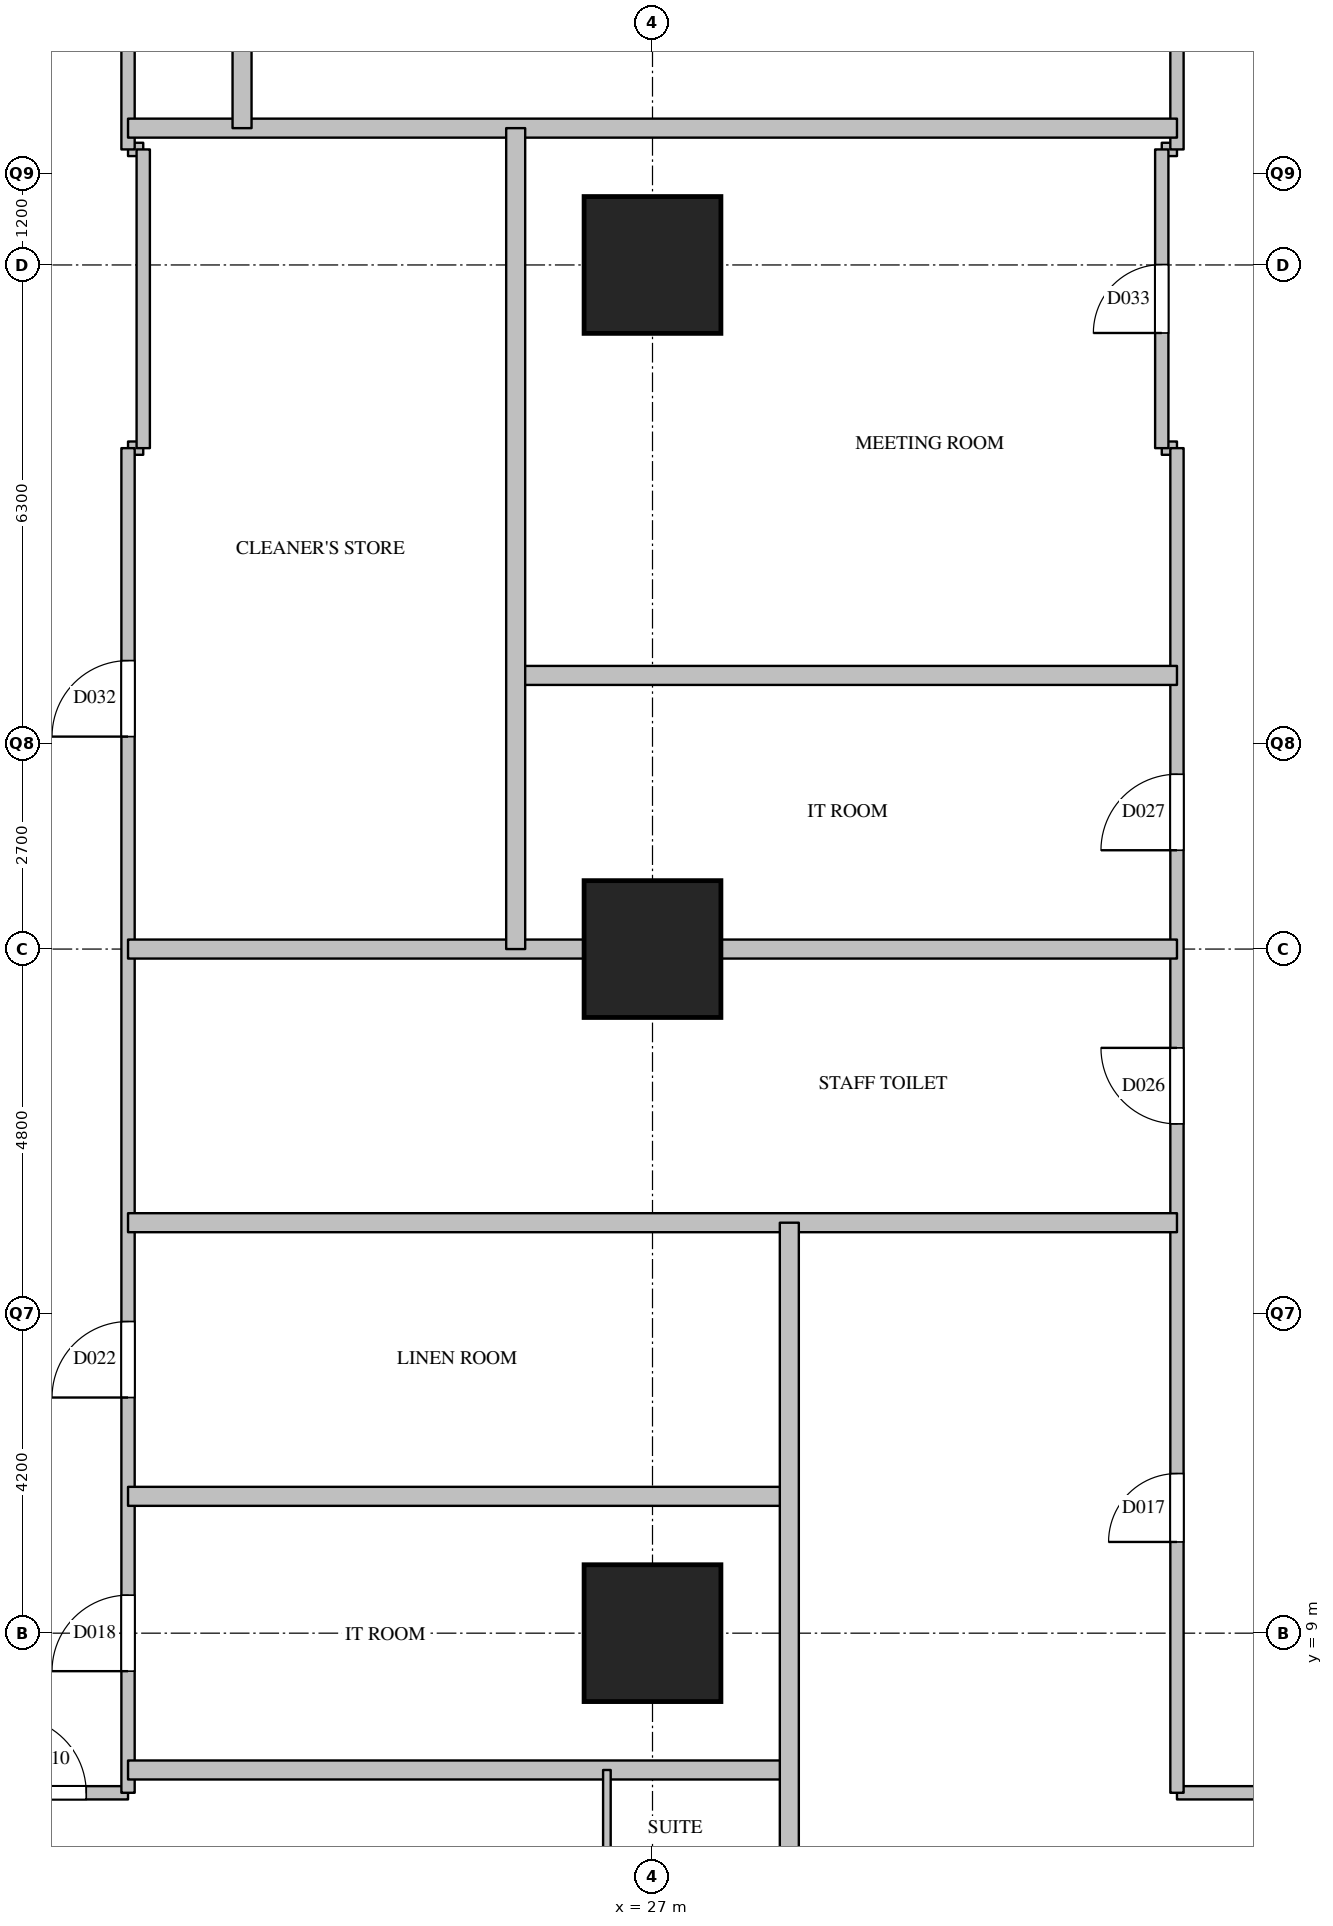
"""IFC4 building model, lengths in metres.
Left out: names, types, materials, properties, quantities, classifications, styles, units other than length and angle.
Written with IfcOpenShell. Run it as: python <this file> out.ifc"""

import sys

from ifc_helpers import new_model, si_unit, direction, frame, frame_2d, origin, origin_2d, place, context, subcontext, project, spatial, rectangle, extrude, element, fill, save


model = new_model("IFC4")
c1 = context("Model", 3, precision=1e-05, world=origin(), true_north=direction((0.0, 1.0)))
c2 = subcontext(c1, "Body", "Model", "MODEL_VIEW")
j1 = project(units=[si_unit("LENGTHUNIT", "METRE"), si_unit("PLANEANGLEUNIT", "RADIAN")], contexts=[c1])
p1 = place(None, origin())
s1 = spatial("IfcSite", under=j1, at=p1, CompositionType="ELEMENT")
p2 = place(p1, origin())
s2 = spatial("IfcBuilding", under=s1, at=p2, CompositionType="ELEMENT")
p3 = place(p2, frame((0.0, 0.0, 69.0)))
s3 = spatial("IfcBuildingStorey", under=s2, at=p3, CompositionType="ELEMENT", Elevation=69.0)
for number, where, z_axis, x_axis in (
    (1, (27.0, 9.0, 0.0), (0.0, 0.0, 1.0), (1.0, 0.0, 0.0)),
    (2, (27.0, 18.0, 0.0), (0.0, 0.0, 1.0), (1.0, 0.0, 0.0)),
    (3, (27.0, 27.0, 0.0), (0.0, 0.0, 1.0), (1.0, 0.0, 0.0)),
):
    element("IfcColumn", number, at=place(p3, frame(where, z_axis=z_axis, x_axis=x_axis)), inside=s3, PredefinedType="COLUMN", context=c2, shape_type="SweptSolid", body=[
        extrude(rectangle(XDim=1.8, YDim=1.8, at=origin_2d()), origin(), (0.0, 0.0, 1.0), 3.8),
    ])
p4 = place(p3, frame((6.9, 6.9, 0.0), z_axis=(0.0, 0.0, 1.0), x_axis=(1.0, 0.0, 0.0)))
e4 = element("IfcWall", 4, at=p4, inside=s3, PredefinedType="PARTITIONING", context=c2, shape_type="SweptSolid", body=[
    extrude(rectangle(XDim=13.2, YDim=0.175, at=frame_2d((6.6, 0.0))), origin(), (0.0, 0.0, 1.0), 3.5),
])
p5 = place(p4, frame((4.2, 0.0, 0.0)))
e5 = element("IfcOpeningElement", 5, at=p5, cuts=e4, PredefinedType="OPENING", context=c2, shape_type="SweptSolid", body=[
    extrude(rectangle(XDim=1.0, YDim=2.1, at=frame_2d((0.5, 1.05))), frame((0.0, 0.097, 0.0), z_axis=(0.0, -1.0, 0.0), x_axis=(1.0, 0.0, 0.0)), (0.0, 0.0, 1.0), 0.195),
])
p6 = place(p4, frame((7.8, 0.0, 0.0)))
e6 = element("IfcOpeningElement", 6, at=p6, cuts=e4, PredefinedType="OPENING", context=c2, shape_type="SweptSolid", body=[
    extrude(rectangle(XDim=1.0, YDim=2.1, at=frame_2d((0.5, 1.05))), frame((0.0, 0.097, 0.0), z_axis=(0.0, -1.0, 0.0), x_axis=(1.0, 0.0, 0.0)), (0.0, 0.0, 1.0), 0.195),
])
p7 = place(p4, frame((11.65, 0.0, 0.0)))
e7 = element("IfcOpeningElement", 7, at=p7, cuts=e4, PredefinedType="OPENING", context=c2, shape_type="SweptSolid", body=[
    extrude(rectangle(XDim=1.0, YDim=2.1, at=frame_2d((0.5, 1.05))), frame((0.0, 0.097, 0.0), z_axis=(0.0, -1.0, 0.0), x_axis=(1.0, 0.0, 0.0)), (0.0, 0.0, 1.0), 0.195),
])
p8 = place(p4, frame((0.25, 0.0, 0.0)))
e8 = element("IfcOpeningElement", 8, at=p8, cuts=e4, PredefinedType="OPENING", context=c2, shape_type="SweptSolid", body=[
    extrude(rectangle(XDim=1.0, YDim=2.1, at=frame_2d((0.5, 1.05))), frame((0.0, 0.097, 0.0), z_axis=(0.0, -1.0, 0.0), x_axis=(1.0, 0.0, 0.0)), (0.0, 0.0, 1.0), 0.195),
])
p9 = place(p3, frame((33.9, 6.9, 0.0), z_axis=(0.0, 0.0, 1.0), x_axis=(1.0, 0.0, 0.0)))
e9 = element("IfcWall", 9, at=p9, inside=s3, PredefinedType="PARTITIONING", context=c2, shape_type="SweptSolid", body=[
    extrude(rectangle(XDim=13.2, YDim=0.175, at=frame_2d((6.6, 0.0))), origin(), (0.0, 0.0, 1.0), 3.5),
])
p10 = place(p9, frame((4.0, 0.0, 0.0)))
e10 = element("IfcOpeningElement", 10, at=p10, cuts=e9, PredefinedType="OPENING", context=c2, shape_type="SweptSolid", body=[
    extrude(rectangle(XDim=1.0, YDim=2.1, at=frame_2d((0.5, 1.05))), frame((0.0, 0.097, 0.0), z_axis=(0.0, -1.0, 0.0), x_axis=(1.0, 0.0, 0.0)), (0.0, 0.0, 1.0), 0.195),
])
for number, where, z_axis, x_axis in (
    (11, (20.1, 24.59, 0.0), (0.0, 0.0, 1.0), (1.0, 0.0, 0.0)),
    (12, (33.7, 24.59, 0.0), (0.0, 0.0, 1.0), (1.0, 0.0, 0.0)),
    (13, (20.1, 28.52, 0.0), (0.0, 0.0, 1.0), (1.0, 0.0, 0.0)),
    (14, (33.7, 28.52, 0.0), (0.0, 0.0, 1.0), (1.0, 0.0, 0.0)),
):
    element("IfcWall", number, at=place(p3, frame(where, z_axis=z_axis, x_axis=x_axis)), inside=s3, PredefinedType="PARTITIONING", context=c2, shape_type="SweptSolid", body=[
        extrude(rectangle(XDim=0.2, YDim=0.175, at=frame_2d((0.1, 0.0))), origin(), (0.0, 0.0, 1.0), 3.5),
    ])
p11 = place(p3, frame((20.1, 6.9, 0.0), z_axis=(0.0, 0.0, 1.0), x_axis=(0.0, 1.0, 0.0)))
e15 = element("IfcWall", 15, at=p11, inside=s3, PredefinedType="PARTITIONING", context=c2, shape_type="SweptSolid", body=[
    extrude(rectangle(XDim=17.69, YDim=0.175, at=frame_2d((8.845, 0.0))), origin(), (0.0, 0.0, 1.0), 3.5),
])
p12 = place(p11, frame((1.6, 0.0, 0.0)))
e16 = element("IfcOpeningElement", 16, at=p12, cuts=e15, PredefinedType="OPENING", context=c2, shape_type="SweptSolid", body=[
    extrude(rectangle(XDim=1.0, YDim=2.1, at=frame_2d((0.5, 1.05))), frame((0.0, 0.097, 0.0), z_axis=(0.0, -1.0, 0.0), x_axis=(1.0, 0.0, 0.0)), (0.0, 0.0, 1.0), 0.195),
])
p13 = place(p11, frame((5.2, 0.0, 0.0)))
e17 = element("IfcOpeningElement", 17, at=p13, cuts=e15, PredefinedType="OPENING", context=c2, shape_type="SweptSolid", body=[
    extrude(rectangle(XDim=1.0, YDim=2.1, at=frame_2d((0.5, 1.05))), frame((0.0, 0.097, 0.0), z_axis=(0.0, -1.0, 0.0), x_axis=(1.0, 0.0, 0.0)), (0.0, 0.0, 1.0), 0.195),
])
p14 = place(p11, frame((13.895, 0.0, 0.0)))
e18 = element("IfcOpeningElement", 18, at=p14, cuts=e15, PredefinedType="OPENING", context=c2, shape_type="SweptSolid", body=[
    extrude(rectangle(XDim=1.0, YDim=2.1, at=frame_2d((0.5, 1.05))), frame((0.0, 0.097, 0.0), z_axis=(0.0, -1.0, 0.0), x_axis=(1.0, 0.0, 0.0)), (0.0, 0.0, 1.0), 0.195),
])
p15 = place(p3, frame((20.1, 28.52, 0.0), z_axis=(0.0, 0.0, 1.0), x_axis=(0.0, 1.0, 0.0)))
e19 = element("IfcWall", 19, at=p15, inside=s3, PredefinedType="PARTITIONING", context=c2, shape_type="SweptSolid", body=[
    extrude(rectangle(XDim=23.58, YDim=0.175, at=frame_2d((11.79, 0.0))), origin(), (0.0, 0.0, 1.0), 3.5),
])
p16 = place(p15, frame((3.43, 0.0, 0.0)))
e20 = element("IfcOpeningElement", 20, at=p16, cuts=e19, PredefinedType="OPENING", context=c2, shape_type="SweptSolid", body=[
    extrude(rectangle(XDim=0.9, YDim=2.1, at=frame_2d((0.45, 1.05))), frame((0.0, 0.097, 0.0), z_axis=(0.0, -1.0, 0.0), x_axis=(1.0, 0.0, 0.0)), (0.0, 0.0, 1.0), 0.195),
])
p17 = place(p15, frame((15.08, 0.0, 0.0)))
e21 = element("IfcOpeningElement", 21, at=p17, cuts=e19, PredefinedType="OPENING", context=c2, shape_type="SweptSolid", body=[
    extrude(rectangle(XDim=0.9, YDim=2.1, at=frame_2d((0.45, 1.05))), frame((0.0, 0.097, 0.0), z_axis=(0.0, -1.0, 0.0), x_axis=(1.0, 0.0, 0.0)), (0.0, 0.0, 1.0), 0.195),
])
p18 = place(p3, frame((20.3, 24.59, 0.0), z_axis=(0.0, 0.0, 1.0), x_axis=(0.0, 1.0, 0.0)))
e22 = element("IfcWall", 22, at=p18, inside=s3, PredefinedType="PARTITIONING", context=c2, shape_type="SweptSolid", body=[
    extrude(rectangle(XDim=3.93, YDim=0.175, at=frame_2d((1.965, 0.0))), origin(), (0.0, 0.0, 1.0), 2.5),
])
p19 = place(p3, frame((33.7, 24.59, 0.0), z_axis=(0.0, 0.0, 1.0), x_axis=(0.0, 1.0, 0.0)))
e23 = element("IfcWall", 23, at=p19, inside=s3, PredefinedType="PARTITIONING", context=c2, shape_type="SweptSolid", body=[
    extrude(rectangle(XDim=3.93, YDim=0.175, at=frame_2d((1.965, 0.0))), origin(), (0.0, 0.0, 1.0), 2.5),
])
p20 = place(p19, frame((1.515, 0.0, 0.0)))
e24 = element("IfcOpeningElement", 24, at=p20, cuts=e23, PredefinedType="OPENING", context=c2, shape_type="SweptSolid", body=[
    extrude(rectangle(XDim=0.9, YDim=2.1, at=frame_2d((0.45, 1.05))), frame((0.0, 0.097, 0.0), z_axis=(0.0, -1.0, 0.0), x_axis=(1.0, 0.0, 0.0)), (0.0, 0.0, 1.0), 0.195),
])
p21 = place(p3, frame((33.9, 6.9, 0.0), z_axis=(0.0, 0.0, 1.0), x_axis=(0.0, 1.0, 0.0)))
e25 = element("IfcWall", 25, at=p21, inside=s3, PredefinedType="PARTITIONING", context=c2, shape_type="SweptSolid", body=[
    extrude(rectangle(XDim=17.69, YDim=0.175, at=frame_2d((8.845, 0.0))), origin(), (0.0, 0.0, 1.0), 3.5),
])
p22 = place(p21, frame((3.3, 0.0, 0.0)))
e26 = element("IfcOpeningElement", 26, at=p22, cuts=e25, PredefinedType="OPENING", context=c2, shape_type="SweptSolid", body=[
    extrude(rectangle(XDim=0.9, YDim=2.1, at=frame_2d((0.45, 1.05))), frame((0.0, 0.097, 0.0), z_axis=(0.0, -1.0, 0.0), x_axis=(1.0, 0.0, 0.0)), (0.0, 0.0, 1.0), 0.195),
])
p23 = place(p21, frame((8.8, 0.0, 0.0)))
e27 = element("IfcOpeningElement", 27, at=p23, cuts=e25, PredefinedType="OPENING", context=c2, shape_type="SweptSolid", body=[
    extrude(rectangle(XDim=1.0, YDim=2.1, at=frame_2d((0.5, 1.05))), frame((0.0, 0.097, 0.0), z_axis=(0.0, -1.0, 0.0), x_axis=(1.0, 0.0, 0.0)), (0.0, 0.0, 1.0), 0.195),
])
p24 = place(p21, frame((12.4, 0.0, 0.0)))
e28 = element("IfcOpeningElement", 28, at=p24, cuts=e25, PredefinedType="OPENING", context=c2, shape_type="SweptSolid", body=[
    extrude(rectangle(XDim=1.0, YDim=2.1, at=frame_2d((0.5, 1.05))), frame((0.0, 0.097, 0.0), z_axis=(0.0, -1.0, 0.0), x_axis=(1.0, 0.0, 0.0)), (0.0, 0.0, 1.0), 0.195),
])
p25 = place(p3, frame((33.9, 28.52, 0.0), z_axis=(0.0, 0.0, 1.0), x_axis=(0.0, 1.0, 0.0)))
e29 = element("IfcWall", 29, at=p25, inside=s3, PredefinedType="PARTITIONING", context=c2, shape_type="SweptSolid", body=[
    extrude(rectangle(XDim=23.58, YDim=0.175, at=frame_2d((11.79, 0.0))), origin(), (0.0, 0.0, 1.0), 3.5),
])
p26 = place(p25, frame((3.38, 0.0, 0.0)))
e30 = element("IfcOpeningElement", 30, at=p26, cuts=e29, PredefinedType="OPENING", context=c2, shape_type="SweptSolid", body=[
    extrude(rectangle(XDim=1.0, YDim=2.1, at=frame_2d((0.5, 1.05))), frame((0.0, 0.097, 0.0), z_axis=(0.0, -1.0, 0.0), x_axis=(1.0, 0.0, 0.0)), (0.0, 0.0, 1.0), 0.195),
])
p27 = place(p25, frame((10.58, 0.0, 0.0)))
e31 = element("IfcOpeningElement", 31, at=p27, cuts=e29, PredefinedType="OPENING", context=c2, shape_type="SweptSolid", body=[
    extrude(rectangle(XDim=1.0, YDim=2.1, at=frame_2d((0.5, 1.05))), frame((0.0, 0.097, 0.0), z_axis=(0.0, -1.0, 0.0), x_axis=(1.0, 0.0, 0.0)), (0.0, 0.0, 1.0), 0.195),
])
p28 = place(p25, frame((15.98, 0.0, 0.0)))
e32 = element("IfcOpeningElement", 32, at=p28, cuts=e29, PredefinedType="OPENING", context=c2, shape_type="SweptSolid", body=[
    extrude(rectangle(XDim=1.0, YDim=2.1, at=frame_2d((0.5, 1.05))), frame((0.0, 0.097, 0.0), z_axis=(0.0, -1.0, 0.0), x_axis=(1.0, 0.0, 0.0)), (0.0, 0.0, 1.0), 0.195),
])
p29 = place(p25, frame((20.48, 0.0, 0.0)))
e33 = element("IfcOpeningElement", 33, at=p29, cuts=e29, PredefinedType="OPENING", context=c2, shape_type="SweptSolid", body=[
    extrude(rectangle(XDim=0.9, YDim=2.1, at=frame_2d((0.45, 1.05))), frame((0.0, 0.097, 0.0), z_axis=(0.0, -1.0, 0.0), x_axis=(1.0, 0.0, 0.0)), (0.0, 0.0, 1.0), 0.195),
])
for number, where, z_axis, x_axis in (
    (34, (20.1, 7.2, 0.0), (0.0, 0.0, 1.0), (1.0, 0.0, 0.0)),
    (35, (20.1, 10.8, 0.0), (0.0, 0.0, 1.0), (1.0, 0.0, 0.0)),
):
    element("IfcWall", number, at=place(p3, frame(where, z_axis=z_axis, x_axis=x_axis)), inside=s3, PredefinedType="PARTITIONING", context=c2, shape_type="SweptSolid", body=[
        extrude(rectangle(XDim=8.7, YDim=0.25, at=frame_2d((4.35, 0.0))), origin(), (0.0, 0.0, 1.0), 2.5),
    ])
p30 = place(p3, frame((20.1, 14.4, 0.0), z_axis=(0.0, 0.0, 1.0), x_axis=(1.0, 0.0, 0.0)))
e36 = element("IfcWall", 36, at=p30, inside=s3, PredefinedType="PARTITIONING", context=c2, shape_type="SweptSolid", body=[
    extrude(rectangle(XDim=13.8, YDim=0.25, at=frame_2d((6.9, 0.0))), origin(), (0.0, 0.0, 1.0), 2.5),
])
p31 = place(p3, frame((20.1, 18.0, 0.0), z_axis=(0.0, 0.0, 1.0), x_axis=(1.0, 0.0, 0.0)))
e37 = element("IfcWall", 37, at=p31, inside=s3, PredefinedType="PARTITIONING", context=c2, shape_type="SweptSolid", body=[
    extrude(rectangle(XDim=13.8, YDim=0.25, at=frame_2d((6.9, 0.0))), origin(), (0.0, 0.0, 1.0), 3.5),
])
p32 = place(p3, frame((25.2, 21.6, 0.0), z_axis=(0.0, 0.0, 1.0), x_axis=(1.0, 0.0, 0.0)))
e38 = element("IfcWall", 38, at=p32, inside=s3, PredefinedType="PARTITIONING", context=c2, shape_type="SweptSolid", body=[
    extrude(rectangle(XDim=8.7, YDim=0.25, at=frame_2d((4.35, 0.0))), origin(), (0.0, 0.0, 1.0), 2.5),
])
p33 = place(p3, frame((20.1, 28.8, 0.0), z_axis=(0.0, 0.0, 1.0), x_axis=(1.0, 0.0, 0.0)))
e39 = element("IfcWall", 39, at=p33, inside=s3, PredefinedType="PARTITIONING", context=c2, shape_type="SweptSolid", body=[
    extrude(rectangle(XDim=13.8, YDim=0.25, at=frame_2d((6.9, 0.0))), origin(), (0.0, 0.0, 1.0), 2.5),
])
p34 = place(p3, frame((21.6, 28.8, 0.0), z_axis=(0.0, 0.0, 1.0), x_axis=(0.0, 1.0, 0.0)))
e40 = element("IfcWall", 40, at=p34, inside=s3, PredefinedType="PARTITIONING", context=c2, shape_type="SweptSolid", body=[
    extrude(rectangle(XDim=7.2, YDim=0.25, at=frame_2d((3.6, 0.0))), origin(), (0.0, 0.0, 1.0), 3.5),
])
p35 = place(p3, frame((25.2, 18.0, 0.0), z_axis=(0.0, 0.0, 1.0), x_axis=(0.0, 1.0, 0.0)))
e41 = element("IfcWall", 41, at=p35, inside=s3, PredefinedType="PARTITIONING", context=c2, shape_type="SweptSolid", body=[
    extrude(rectangle(XDim=10.8, YDim=0.25, at=frame_2d((5.4, 0.0))), origin(), (0.0, 0.0, 1.0), 2.5),
])
p36 = place(p3, frame((28.8, 0.0, 0.0), z_axis=(0.0, 0.0, 1.0), x_axis=(0.0, 1.0, 0.0)))
e42 = element("IfcWall", 42, at=p36, inside=s3, PredefinedType="PARTITIONING", context=c2, shape_type="SweptSolid", body=[
    extrude(rectangle(XDim=14.4, YDim=0.25, at=frame_2d((7.2, 0.0))), origin(), (0.0, 0.0, 1.0), 2.5),
])
p37 = place(p3, frame((26.4, 4.8, 0.0), z_axis=(0.0, 0.0, 1.0), x_axis=(0.0, 1.0, 0.0)))
e43 = element("IfcWall", 43, at=p37, inside=s3, PredefinedType="PARTITIONING", context=c2, shape_type="SweptSolid", body=[
    extrude(rectangle(XDim=2.4, YDim=0.1, at=frame_2d((1.2, 0.0))), origin(), (0.0, 0.0, 1.0), 3.5),
])
p38 = place(p7, origin())
e44 = element("IfcDoor", 44, at=p38, inside=s3, OperationType="SINGLE_SWING_LEFT", PredefinedType="DOOR", context=c2, shape_type="SweptSolid", body=[
    extrude(rectangle(XDim=1.0, YDim=2.1, at=frame_2d((0.5, 1.05))), frame((0.0, 0.025, 0.0), z_axis=(0.0, -1.0, 0.0), x_axis=(1.0, 0.0, 0.0)), (0.0, 0.0, 1.0), 0.05),
])
fill(e7, e44)
p39 = place(p22, origin())
e45 = element("IfcDoor", 45, at=p39, inside=s3, OperationType="SINGLE_SWING_LEFT", PredefinedType="DOOR", context=c2, shape_type="SweptSolid", body=[
    extrude(rectangle(XDim=0.9, YDim=2.1, at=frame_2d((0.45, 1.05))), frame((0.0, 0.025, 0.0), z_axis=(0.0, -1.0, 0.0), x_axis=(1.0, 0.0, 0.0)), (0.0, 0.0, 1.0), 0.05),
])
fill(e26, e45)
p40 = place(p12, origin())
e46 = element("IfcDoor", 46, at=p40, inside=s3, OperationType="SINGLE_SWING_LEFT", PredefinedType="DOOR", context=c2, shape_type="SweptSolid", body=[
    extrude(rectangle(XDim=1.0, YDim=2.1, at=frame_2d((0.5, 1.05))), frame((0.0, 0.025, 0.0), z_axis=(0.0, -1.0, 0.0), x_axis=(1.0, 0.0, 0.0)), (0.0, 0.0, 1.0), 0.05),
])
fill(e16, e46)
p41 = place(p13, origin())
e47 = element("IfcDoor", 47, at=p41, inside=s3, OperationType="SINGLE_SWING_LEFT", PredefinedType="DOOR", context=c2, shape_type="SweptSolid", body=[
    extrude(rectangle(XDim=1.0, YDim=2.1, at=frame_2d((0.5, 1.05))), frame((0.0, 0.025, 0.0), z_axis=(0.0, -1.0, 0.0), x_axis=(1.0, 0.0, 0.0)), (0.0, 0.0, 1.0), 0.05),
])
fill(e17, e47)
p42 = place(p23, origin())
e48 = element("IfcDoor", 48, at=p42, inside=s3, OperationType="SINGLE_SWING_RIGHT", PredefinedType="DOOR", context=c2, shape_type="SweptSolid", body=[
    extrude(rectangle(XDim=1.0, YDim=2.1, at=frame_2d((0.5, 1.05))), frame((0.0, 0.025, 0.0), z_axis=(0.0, -1.0, 0.0), x_axis=(1.0, 0.0, 0.0)), (0.0, 0.0, 1.0), 0.05),
])
fill(e27, e48)
p43 = place(p24, origin())
e49 = element("IfcDoor", 49, at=p43, inside=s3, OperationType="SINGLE_SWING_LEFT", PredefinedType="DOOR", context=c2, shape_type="SweptSolid", body=[
    extrude(rectangle(XDim=1.0, YDim=2.1, at=frame_2d((0.5, 1.05))), frame((0.0, 0.025, 0.0), z_axis=(0.0, -1.0, 0.0), x_axis=(1.0, 0.0, 0.0)), (0.0, 0.0, 1.0), 0.05),
])
fill(e28, e49)
p44 = place(p14, origin())
e50 = element("IfcDoor", 50, at=p44, inside=s3, OperationType="SINGLE_SWING_LEFT", PredefinedType="DOOR", context=c2, shape_type="SweptSolid", body=[
    extrude(rectangle(XDim=1.0, YDim=2.1, at=frame_2d((0.5, 1.05))), frame((0.0, 0.025, 0.0), z_axis=(0.0, -1.0, 0.0), x_axis=(1.0, 0.0, 0.0)), (0.0, 0.0, 1.0), 0.05),
])
fill(e18, e50)
p45 = place(p20, origin())
e51 = element("IfcDoor", 51, at=p45, inside=s3, OperationType="SINGLE_SWING_LEFT", PredefinedType="DOOR", context=c2, shape_type="SweptSolid", body=[
    extrude(rectangle(XDim=0.9, YDim=2.1, at=frame_2d((0.45, 1.05))), frame((0.0, 0.025, 0.0), z_axis=(0.0, -1.0, 0.0), x_axis=(1.0, 0.0, 0.0)), (0.0, 0.0, 1.0), 0.05),
])
fill(e24, e51)
save(model, sys.argv[1])
